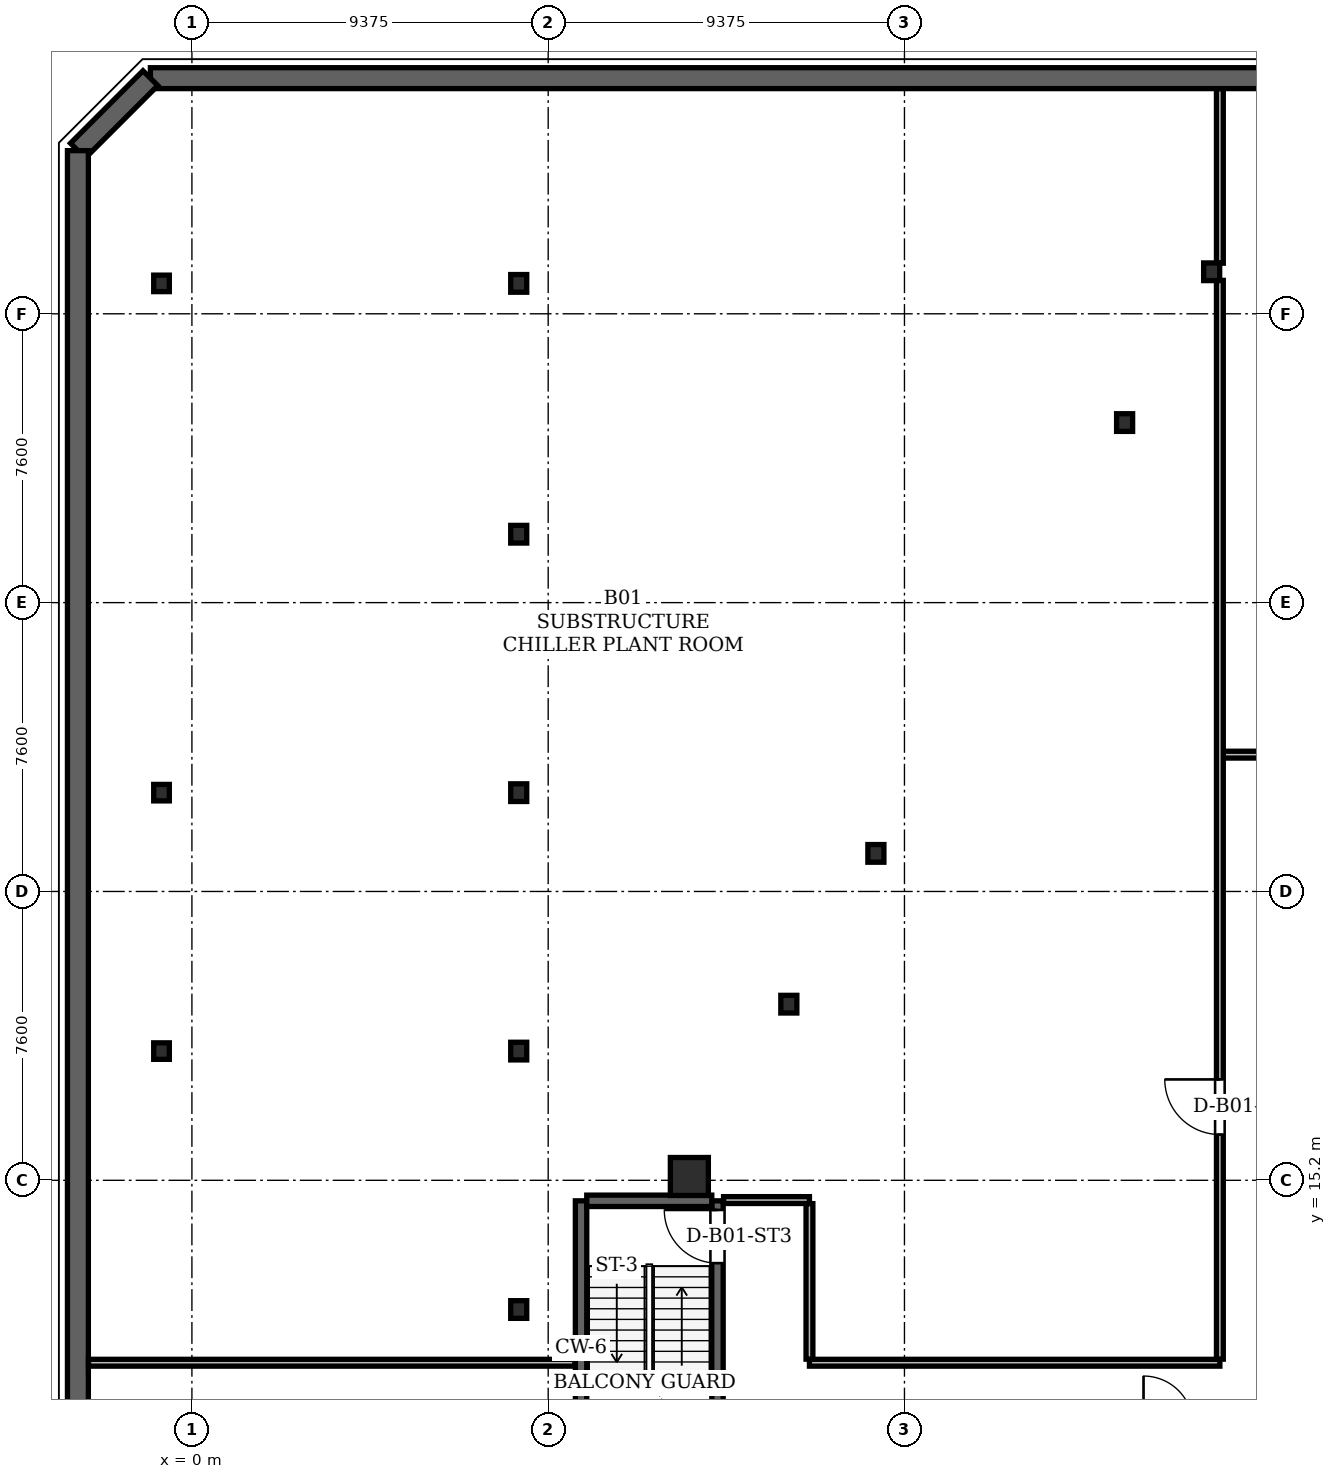
"""IFC4 building model, lengths in metres.
Left out: names, types, materials, properties, quantities, classifications, styles, units other than length and angle.
Written with IfcOpenShell. Run it as: python <this file> out.ifc"""

import sys

from ifc_helpers import new_model, si_unit, direction, frame, frame_2d, origin, origin_2d, place, context, subcontext, project, spatial, rectangle, hollow_rectangle, i_section, extrude, element, fill, save


model = new_model("IFC4")
c1 = context("Model", 3, precision=1e-05, world=origin(), true_north=direction((0.0, 1.0)))
c2 = subcontext(c1, "Body", "Model", "MODEL_VIEW")
j1 = project(units=[si_unit("LENGTHUNIT", "METRE"), si_unit("PLANEANGLEUNIT", "RADIAN")], contexts=[c1])
p1 = place(None, origin())
s1 = spatial("IfcSite", under=j1, at=p1, CompositionType="ELEMENT")
p2 = place(p1, origin())
s2 = spatial("IfcBuilding", under=s1, at=p2, CompositionType="ELEMENT")
p3 = place(p2, frame((0.0, 0.0, -4.0)))
s3 = spatial("IfcBuildingStorey", under=s2, at=p3, CompositionType="ELEMENT", Elevation=-4.0)
p4 = place(p3, frame((13.09, 15.3, 0.004), z_axis=(0.0, 0.0, 1.0), x_axis=(1.0, 0.0, 0.0)))
e1 = element("IfcColumn", 1, at=p4, inside=s3, PredefinedType="COLUMN", context=c2, shape_type="SweptSolid", body=[
    extrude(hollow_rectangle(XDim=1.0, YDim=1.0, WallThickness=0.085, at=origin_2d()), origin(), (0.0, 0.0, 1.0), 3.991),
])
for number, where, z_axis, x_axis in (
    (2, (26.834, 39.106, 0.004), (0.0, 0.0, 1.0), (1.0, 0.0, 0.0)),
    (3, (24.543, 35.138, 0.004), (0.0, 0.0, 1.0), (1.0, 0.0, 0.0)),
    (4, (17.998, 23.802, 0.004), (0.0, 0.0, 1.0), (1.0, 0.0, 0.0)),
    (5, (15.708, 19.834, 0.004), (0.0, 0.0, 1.0), (1.0, 0.0, 0.0)),
):
    element("IfcColumn", number, at=place(p3, frame(where, z_axis=z_axis, x_axis=x_axis)), inside=s3, PredefinedType="COLUMN", context=c2, shape_type="SweptSolid", body=[
        extrude(i_section(OverallWidth=0.422, OverallDepth=0.465, WebThickness=0.045, FlangeThickness=0.072, at=origin_2d()), origin(), (0.0, 0.0, 1.0), 3.991),
    ])
for number, where, z_axis, x_axis in (
    (6, (8.6, 11.8, 0.0), (0.0, 0.0, 1.0), (1.0, 0.0, 0.0)),
    (7, (8.6, 18.6, 0.0), (0.0, 0.0, 1.0), (1.0, 0.0, 0.0)),
    (8, (8.6, 25.4, 0.0), (0.0, 0.0, 1.0), (1.0, 0.0, 0.0)),
    (9, (8.6, 32.2, 0.0), (0.0, 0.0, 1.0), (1.0, 0.0, 0.0)),
    (10, (8.6, 38.8, 0.0), (0.0, 0.0, 1.0), (1.0, 0.0, 0.0)),
):
    element("IfcColumn", number, at=place(p3, frame(where, z_axis=z_axis, x_axis=x_axis)), inside=s3, PredefinedType="COLUMN", context=c2, shape_type="SweptSolid", body=[
        extrude(i_section(OverallWidth=0.422, OverallDepth=0.465, WebThickness=0.045, FlangeThickness=0.072, at=origin_2d()), origin(), (0.0, 0.0, 1.0), 4.0),
    ])
for number, where, z_axis, x_axis in (
    (11, (-0.8, 18.6, 0.0), (0.0, 0.0, 1.0), (1.0, 0.0, 0.0)),
    (12, (-0.8, 25.4, 0.0), (0.0, 0.0, 1.0), (1.0, 0.0, 0.0)),
    (13, (-0.8, 38.8, 0.0), (0.0, 0.0, 1.0), (1.0, 0.0, 0.0)),
):
    element("IfcColumn", number, at=place(p3, frame(where, z_axis=z_axis, x_axis=x_axis)), inside=s3, PredefinedType="COLUMN", context=c2, shape_type="SweptSolid", body=[
        extrude(i_section(OverallWidth=0.411, OverallDepth=0.434, WebThickness=0.036, FlangeThickness=0.057, at=origin_2d()), origin(), (0.0, 0.0, 1.0), 4.0),
    ])
p5 = place(p3, frame((10.24, 6.94, 0.0), z_axis=(0.0, 0.0, 1.0), x_axis=(0.0, 1.0, 0.0)))
e14 = element("IfcWall", 14, at=p5, inside=s3, PredefinedType="SHEAR", context=c2, shape_type="SweptSolid", body=[
    extrude(rectangle(XDim=7.72, YDim=0.3, at=frame_2d((3.86, 0.0))), origin(), (0.0, 0.0, 1.0), 3.68),
])
p6 = place(p3, frame((13.83, 6.94, 0.0), z_axis=(0.0, 0.0, 1.0), x_axis=(0.0, 1.0, 0.0)))
e15 = element("IfcWall", 15, at=p6, inside=s3, PredefinedType="SHEAR", context=c2, shape_type="SweptSolid", body=[
    extrude(rectangle(XDim=7.72, YDim=0.3, at=frame_2d((3.86, 0.0))), origin(), (0.0, 0.0, 1.0), 3.68),
])
p7 = place(p6, frame((6.08, 0.0, 0.0)))
e16 = element("IfcOpeningElement", 16, at=p7, cuts=e15, PredefinedType="OPENING", context=c2, shape_type="SweptSolid", body=[
    extrude(rectangle(XDim=1.4, YDim=2.2, at=frame_2d((0.7, 1.1))), frame((0.0, 0.15, 0.0), z_axis=(0.0, -1.0, 0.0), x_axis=(1.0, 0.0, 0.0)), (0.0, 0.0, 1.0), 0.3),
])
p8 = place(p3, frame((10.39, 14.66, 0.0), z_axis=(0.0, 0.0, 1.0), x_axis=(1.0, 0.0, 0.0)))
e17 = element("IfcWall", 17, at=p8, inside=s3, PredefinedType="SHEAR", context=c2, shape_type="SweptSolid", body=[
    extrude(rectangle(XDim=3.29, YDim=0.3, at=frame_2d((1.645, 0.0))), origin(), (0.0, 0.0, 1.0), 3.68),
])
p9 = place(p3, frame((76.093, 44.2, 0.0), z_axis=(0.0, 0.0, 1.0), x_axis=(-1.0, 0.0, 0.0)))
e18 = element("IfcWall", 18, at=p9, inside=s3, PredefinedType="USERDEFINED", context=c2, shape_type="SweptSolid", body=[
    extrude(rectangle(XDim=77.186, YDim=0.55, at=frame_2d((38.593, 0.0))), origin(), (0.0, 0.0, 1.0), 3.68),
])
p10 = place(p3, frame((-1.093, 44.2, 0.0), z_axis=(0.0, 0.0, 1.0), x_axis=(-0.707106781187, -0.707106781187, 0.0)))
e19 = element("IfcWall", 19, at=p10, inside=s3, PredefinedType="USERDEFINED", context=c2, shape_type="SweptSolid", body=[
    extrude(rectangle(XDim=2.697, YDim=0.55, at=frame_2d((1.348, 0.0))), origin(), (0.0, 0.0, 1.0), 3.68),
])
p11 = place(p3, frame((-3.0, 42.293, 0.0), z_axis=(0.0, 0.0, 1.0), x_axis=(0.0, -1.0, 0.0)))
e20 = element("IfcWall", 20, at=p11, inside=s3, PredefinedType="USERDEFINED", context=c2, shape_type="SweptSolid", body=[
    extrude(rectangle(XDim=38.986, YDim=0.55, at=frame_2d((19.493, 0.0))), origin(), (0.0, 0.0, 1.0), 3.68),
])
p12 = place(p3, frame((-2.721, 10.4, 0.0), z_axis=(0.0, 0.0, 1.0), x_axis=(1.0, 0.0, 0.0)))
e21 = element("IfcWall", 21, at=p12, inside=s3, PredefinedType="PARTITIONING", context=c2, shape_type="SweptSolid", body=[
    extrude(rectangle(XDim=12.801, YDim=0.18, at=frame_2d((6.4, 0.0))), origin(), (0.0, 0.0, 1.0), 2.743),
])
p13 = place(p3, frame((16.25, 10.4, 0.0), z_axis=(0.0, 0.0, 1.0), x_axis=(1.0, 0.0, 0.0)))
e22 = element("IfcWall", 22, at=p13, inside=s3, PredefinedType="PARTITIONING", context=c2, shape_type="SweptSolid", body=[
    extrude(rectangle(XDim=10.8, YDim=0.18, at=frame_2d((5.4, 0.0))), origin(), (0.0, 0.0, 1.0), 3.68),
])
p14 = place(p3, frame((13.99, 14.68, 0.0), z_axis=(0.0, 0.0, 1.0), x_axis=(1.0, 0.0, 0.0)))
e23 = element("IfcWall", 23, at=p14, inside=s3, PredefinedType="PARTITIONING", context=c2, shape_type="SweptSolid", body=[
    extrude(rectangle(XDim=2.26, YDim=0.18, at=frame_2d((1.13, 0.0))), origin(), (0.0, 0.0, 1.0), 2.743),
])
p15 = place(p3, frame((27.05, 26.4, 0.0), z_axis=(0.0, 0.0, 1.0), x_axis=(1.0, 0.0, 0.0)))
e24 = element("IfcWall", 24, at=p15, inside=s3, PredefinedType="PARTITIONING", context=c2, shape_type="SweptSolid", body=[
    extrude(rectangle(XDim=28.55, YDim=0.18, at=frame_2d((14.275, 0.0))), origin(), (0.0, 0.0, 1.0), 2.743),
])
p16 = place(p15, frame((8.752, 0.0, 0.0)))
e25 = element("IfcOpeningElement", 25, at=p16, cuts=e24, PredefinedType="OPENING", context=c2, shape_type="SweptSolid", body=[
    extrude(rectangle(XDim=1.45, YDim=2.25, at=frame_2d((0.725, 1.125))), frame((0.0, 0.09, 0.0), z_axis=(0.0, -1.0, 0.0), x_axis=(1.0, 0.0, 0.0)), (0.0, 0.0, 1.0), 0.18),
])
p17 = place(p15, frame((21.538, 0.0, 0.0)))
e26 = element("IfcOpeningElement", 26, at=p17, cuts=e24, PredefinedType="OPENING", context=c2, shape_type="SweptSolid", body=[
    extrude(rectangle(XDim=0.88, YDim=2.08, at=frame_2d((0.44, 1.04))), frame((0.0, 0.09, 0.0), z_axis=(0.0, -1.0, 0.0), x_axis=(1.0, 0.0, 0.0)), (0.0, 0.0, 1.0), 0.18),
])
p18 = place(p15, frame((25.884, 0.0, 0.0)))
e27 = element("IfcOpeningElement", 27, at=p18, cuts=e24, PredefinedType="OPENING", context=c2, shape_type="SweptSolid", body=[
    extrude(rectangle(XDim=0.88, YDim=2.08, at=frame_2d((0.44, 1.04))), frame((0.0, 0.09, 0.0), z_axis=(0.0, -1.0, 0.0), x_axis=(1.0, 0.0, 0.0)), (0.0, 0.0, 1.0), 0.18),
])
p19 = place(p3, frame((16.25, 10.494, 0.0), z_axis=(0.0, 0.0, 1.0), x_axis=(0.0, 1.0, 0.0)))
e28 = element("IfcWall", 28, at=p19, inside=s3, PredefinedType="PARTITIONING", context=c2, shape_type="SweptSolid", body=[
    extrude(rectangle(XDim=4.092, YDim=0.18, at=frame_2d((2.046, 0.0))), origin(), (0.0, 0.0, 1.0), 2.743),
])
p20 = place(p3, frame((27.05, 10.494, 0.0), z_axis=(0.0, 0.0, 1.0), x_axis=(0.0, 1.0, 0.0)))
e29 = element("IfcWall", 29, at=p20, inside=s3, PredefinedType="PARTITIONING", context=c2, shape_type="SweptSolid", body=[
    extrude(rectangle(XDim=28.386, YDim=0.18, at=frame_2d((14.193, 0.0))), origin(), (0.0, 0.0, 1.0), 2.743),
])
p21 = place(p20, frame((5.91, 0.0, 0.0)))
e30 = element("IfcOpeningElement", 30, at=p21, cuts=e29, PredefinedType="OPENING", context=c2, shape_type="SweptSolid", body=[
    extrude(rectangle(XDim=1.45, YDim=2.25, at=frame_2d((0.725, 1.125))), frame((0.0, 0.09, 0.0), z_axis=(0.0, -1.0, 0.0), x_axis=(1.0, 0.0, 0.0)), (0.0, 0.0, 1.0), 0.18),
])
p22 = place(p3, frame((27.05, 39.332, 0.0), z_axis=(0.0, 0.0, 1.0), x_axis=(0.0, 1.0, 0.0)))
e31 = element("IfcWall", 31, at=p22, inside=s3, PredefinedType="PARTITIONING", context=c2, shape_type="SweptSolid", body=[
    extrude(rectangle(XDim=4.589, YDim=0.18, at=frame_2d((2.295, 0.0))), origin(), (0.0, 0.0, 1.0), 2.814),
])
p23 = place(p7, origin())
e32 = element("IfcDoor", 32, at=p23, inside=s3, OperationType="SINGLE_SWING_RIGHT", PredefinedType="DOOR", context=c2, shape_type="SweptSolid", body=[
    extrude(rectangle(XDim=1.4, YDim=2.2, at=frame_2d((0.7, 1.1))), frame((0.0, 0.025, 0.0), z_axis=(0.0, -1.0, 0.0), x_axis=(1.0, 0.0, 0.0)), (0.0, 0.0, 1.0), 0.05),
])
fill(e16, e32)
p24 = place(p21, origin())
e33 = element("IfcDoor", 33, at=p24, inside=s3, OperationType="SINGLE_SWING_RIGHT", PredefinedType="DOOR", context=c2, shape_type="SweptSolid", body=[
    extrude(rectangle(XDim=1.45, YDim=2.25, at=frame_2d((0.725, 1.125))), frame((0.0, 0.025, 0.0), z_axis=(0.0, -1.0, 0.0), x_axis=(1.0, 0.0, 0.0)), (0.0, 0.0, 1.0), 0.05),
])
fill(e30, e33)
save(model, sys.argv[1])
